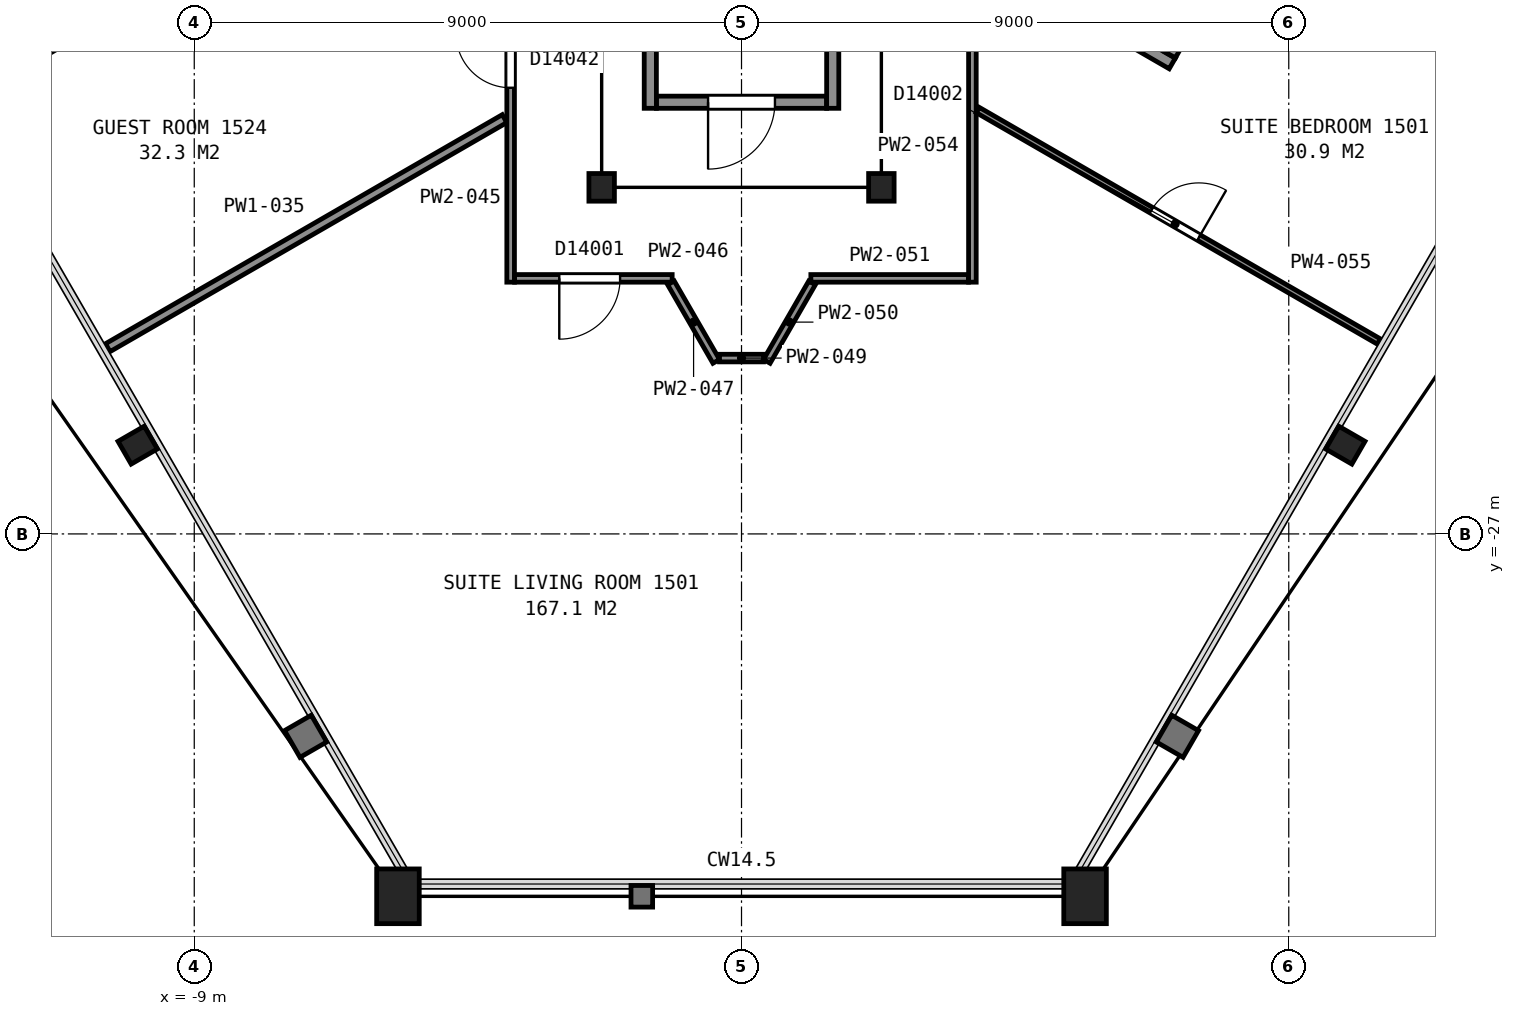
"""IFC4 building model, lengths in metres.
Left out: names, types, materials, properties, quantities, classifications, styles, units other than length and angle.
Written with IfcOpenShell. Run it as: python <this file> out.ifc"""

import sys

from ifc_helpers import new_model, si_unit, direction, frame, frame_2d, origin, origin_2d, place, context, subcontext, project, spatial, rectangle, hollow_rectangle, i_section, extrude, element, fill, save


model = new_model("IFC4")
c1 = context("Model", 3, precision=1e-05, world=origin(), true_north=direction((0.0, 1.0)))
c2 = subcontext(c1, "Body", "Model", "MODEL_VIEW")
j1 = project(units=[si_unit("LENGTHUNIT", "METRE"), si_unit("PLANEANGLEUNIT", "RADIAN")], contexts=[c1])
p1 = place(None, origin())
s1 = spatial("IfcSite", under=j1, at=p1, CompositionType="ELEMENT")
p2 = place(p1, origin())
s2 = spatial("IfcBuilding", under=s1, at=p2, CompositionType="ELEMENT")
p3 = place(p2, frame((0.0, 0.0, 69.2)))
s3 = spatial("IfcBuildingStorey", under=s2, at=p3, CompositionType="ELEMENT", Elevation=69.2)
p4 = place(p3, frame((-9.93, -25.54, 0.0), z_axis=(0.0, 0.0, 1.0), x_axis=(-0.5, 0.866025403784, 0.0)))
e1 = element("IfcColumn", 1, at=p4, inside=s3, PredefinedType="COLUMN", context=c2, shape_type="SweptSolid", body=[
    extrude(i_section(OverallWidth=0.432, OverallDepth=0.498, WebThickness=0.056, FlangeThickness=0.089, FilletRadius=0.015, at=origin_2d()), origin(), (0.0, 0.0, 1.0), 3.575),
])
for number, where, z_axis, x_axis in (
    (2, (-5.65, -32.96, 0.0), (0.0, 0.0, 1.0), (-1.0, 0.0, 0.0)),
    (3, (5.65, -32.96, 0.0), (0.0, 0.0, 1.0), (-1.0, 0.0, 0.0)),
):
    element("IfcColumn", number, at=place(p3, frame(where, z_axis=z_axis, x_axis=x_axis)), inside=s3, PredefinedType="COLUMN", context=c2, shape_type="SweptSolid", body=[
        extrude(hollow_rectangle(XDim=0.7, YDim=0.9, WallThickness=0.065, at=origin_2d()), origin(), (0.0, 0.0, 1.0), 3.56),
    ])
p5 = place(p3, frame((9.93, -25.54, 0.0), z_axis=(0.0, 0.0, 1.0), x_axis=(-0.5, -0.866025403784, 0.0)))
e4 = element("IfcColumn", 4, at=p5, inside=s3, PredefinedType="COLUMN", context=c2, shape_type="SweptSolid", body=[
    extrude(i_section(OverallWidth=0.432, OverallDepth=0.498, WebThickness=0.056, FlangeThickness=0.089, FilletRadius=0.015, at=origin_2d()), origin(), (0.0, 0.0, 1.0), 3.575),
])
for number, where, z_axis, x_axis in (
    (5, (-2.3, -21.3, 0.0), (0.0, 0.0, 1.0), (-1.0, 0.0, 0.0)),
    (6, (2.3, -21.3, 0.0), (0.0, 0.0, 1.0), (-1.0, 0.0, 0.0)),
):
    element("IfcColumn", number, at=place(p3, frame(where, z_axis=z_axis, x_axis=x_axis)), inside=s3, PredefinedType="COLUMN", context=c2, shape_type="SweptSolid", body=[
        extrude(i_section(OverallWidth=0.419, OverallDepth=0.455, WebThickness=0.042, FlangeThickness=0.068, FilletRadius=0.015, at=origin_2d()), origin(), (0.0, 0.0, 1.0), 3.6),
    ])
p6 = place(p3, frame((-1.4, -19.9, 0.0), z_axis=(0.0, 0.0, 1.0), x_axis=(1.0, 0.0, 0.0)))
e7 = element("IfcWall", 7, at=p6, inside=s3, PredefinedType="PARTITIONING", context=c2, shape_type="SweptSolid", body=[
    extrude(rectangle(XDim=2.8, YDim=0.2, at=frame_2d((1.4, 0.0))), origin(), (0.0, 0.0, 1.0), 3.35),
])
p7 = place(p6, frame((0.85, 0.0, 0.0)))
e8 = element("IfcOpeningElement", 8, at=p7, cuts=e7, PredefinedType="OPENING", context=c2, shape_type="SweptSolid", body=[
    extrude(rectangle(XDim=1.1, YDim=2.1, at=frame_2d((0.55, 1.05))), frame((0.0, 0.11, 0.0), z_axis=(0.0, -1.0, 0.0), x_axis=(1.0, 0.0, 0.0)), (0.0, 0.0, 1.0), 0.22),
])
for number, where, z_axis, x_axis in (
    (9, (1.5, -8.0, 0.0), (0.0, 0.0, 1.0), (0.0, -1.0, 0.0)),
    (10, (-1.5, -8.0, 0.0), (0.0, 0.0, 1.0), (0.0, -1.0, 0.0)),
):
    element("IfcWall", number, at=place(p3, frame(where, z_axis=z_axis, x_axis=x_axis)), inside=s3, PredefinedType="PARTITIONING", context=c2, shape_type="SweptSolid", body=[
        extrude(rectangle(XDim=12.0, YDim=0.2, at=frame_2d((6.0, 0.0))), origin(), (0.0, 0.0, 1.0), 3.35),
    ])
p8 = place(p3, frame((-12.794, -19.829, 0.0), z_axis=(0.0, 0.0, 1.0), x_axis=(0.866024716685, 0.500001190089, 0.0)))
e11 = element("IfcWall", 11, at=p8, inside=s3, PredefinedType="PARTITIONING", context=c2, shape_type="SweptSolid", body=[
    extrude(rectangle(XDim=8.492, YDim=0.15, at=frame_2d((4.246, 0.0))), origin(), (0.0, 0.0, 1.0), 2.613),
])
p9 = place(p3, frame((-10.423, -23.937, 0.0), z_axis=(0.0, 0.0, 1.0), x_axis=(0.866039368072, 0.499975812365, 0.0)))
e12 = element("IfcWall", 12, at=p9, inside=s3, PredefinedType="PARTITIONING", context=c2, shape_type="SweptSolid", body=[
    extrude(rectangle(XDim=7.535, YDim=0.15, at=frame_2d((3.768, 0.0))), origin(), (0.0, 0.0, 1.0), 2.613),
])
p10 = place(p3, frame((-3.797, -22.86, 0.0), z_axis=(0.0, 0.0, 1.0), x_axis=(0.0, 1.0, 0.0)))
e13 = element("IfcWall", 13, at=p10, inside=s3, PredefinedType="PARTITIONING", context=c2, shape_type="SweptSolid", body=[
    extrude(rectangle(XDim=4.471, YDim=0.125, at=frame_2d((2.235, 0.0))), origin(), (0.0, 0.0, 1.0), 2.613),
])
p11 = place(p10, frame((3.198, 0.0, 0.0)))
e14 = element("IfcOpeningElement", 14, at=p11, cuts=e13, PredefinedType="OPENING", context=c2, shape_type="SweptSolid", body=[
    extrude(rectangle(XDim=0.9, YDim=2.1, at=frame_2d((0.45, 1.05))), frame((0.0, 0.073, 0.0), z_axis=(0.0, -1.0, 0.0), x_axis=(1.0, 0.0, 0.0)), (0.0, 0.0, 1.0), 0.145),
])
p12 = place(p3, frame((-1.14, -22.797, 0.0), z_axis=(0.0, 0.0, 1.0), x_axis=(-1.0, 0.0, 0.0)))
e15 = element("IfcWall", 15, at=p12, inside=s3, PredefinedType="PARTITIONING", context=c2, shape_type="SweptSolid", body=[
    extrude(rectangle(XDim=2.592, YDim=0.125, at=frame_2d((1.296, 0.0))), origin(), (0.0, 0.0, 1.0), 2.613),
])
p13 = place(p12, frame((0.856, 0.0, 0.0)))
e16 = element("IfcOpeningElement", 16, at=p13, cuts=e15, PredefinedType="OPENING", context=c2, shape_type="SweptSolid", body=[
    extrude(rectangle(XDim=1.0, YDim=2.1, at=frame_2d((0.5, 1.05))), frame((0.0, 0.073, 0.0), z_axis=(0.0, -1.0, 0.0), x_axis=(1.0, 0.0, 0.0)), (0.0, 0.0, 1.0), 0.145),
])
p14 = place(p3, frame((-1.161, -22.871, 0.0), z_axis=(0.0, 0.0, 1.0), x_axis=(0.499609040113, -0.866251006947, 0.0)))
e17 = element("IfcWall", 17, at=p14, inside=s3, PredefinedType="PARTITIONING", context=c2, shape_type="SweptSolid", body=[
    extrude(rectangle(XDim=1.491, YDim=0.125, at=frame_2d((0.746, 0.0))), origin(), (0.0, 0.0, 1.0), 2.613),
])
p15 = place(p3, frame((-0.362, -24.108, 0.0), z_axis=(0.0, 0.0, 1.0), x_axis=(1.0, 0.0, 0.0)))
e18 = element("IfcWall", 18, at=p15, inside=s3, PredefinedType="PARTITIONING", context=c2, shape_type="SweptSolid", body=[
    extrude(rectangle(XDim=0.724, YDim=0.125, at=frame_2d((0.362, 0.0))), origin(), (0.0, 0.0, 1.0), 2.613),
])
p16 = place(p3, frame((0.416, -24.162, 0.0), z_axis=(0.0, 0.0, 1.0), x_axis=(0.499609040113, 0.866251006947, 0.0)))
e19 = element("IfcWall", 19, at=p16, inside=s3, PredefinedType="PARTITIONING", context=c2, shape_type="SweptSolid", body=[
    extrude(rectangle(XDim=1.491, YDim=0.125, at=frame_2d((0.746, 0.0))), origin(), (0.0, 0.0, 1.0), 2.613),
])
p17 = place(p3, frame((1.14, -22.797, 0.0), z_axis=(0.0, 0.0, 1.0), x_axis=(1.0, 0.0, 0.0)))
e20 = element("IfcWall", 20, at=p17, inside=s3, PredefinedType="PARTITIONING", context=c2, shape_type="SweptSolid", body=[
    extrude(rectangle(XDim=2.592, YDim=0.125, at=frame_2d((1.296, 0.0))), origin(), (0.0, 0.0, 1.0), 2.613),
])
p18 = place(p3, frame((3.797, -22.86, 0.0), z_axis=(0.0, 0.0, 1.0), x_axis=(0.0, 1.0, 0.0)))
e21 = element("IfcWall", 21, at=p18, inside=s3, PredefinedType="PARTITIONING", context=c2, shape_type="SweptSolid", body=[
    extrude(rectangle(XDim=4.471, YDim=0.125, at=frame_2d((2.235, 0.0))), origin(), (0.0, 0.0, 1.0), 2.613),
])
p19 = place(p3, frame((3.885, -20.028, 0.0), z_axis=(0.0, 0.0, 1.0), x_axis=(0.866080975745, -0.499903734186, 0.0)))
e22 = element("IfcWall", 22, at=p19, inside=s3, PredefinedType="PARTITIONING", context=c2, shape_type="SweptSolid", body=[
    extrude(rectangle(XDim=7.617, YDim=0.1, at=frame_2d((3.808, 0.0))), origin(), (0.0, 0.0, 1.0), 2.613),
])
p20 = place(p19, frame((3.299, 0.0, 0.0)))
e23 = element("IfcOpeningElement", 23, at=p20, cuts=e22, PredefinedType="OPENING", context=c2, shape_type="SweptSolid", body=[
    extrude(rectangle(XDim=0.9, YDim=2.1, at=frame_2d((0.45, 1.05))), frame((0.0, 0.06, 0.0), z_axis=(0.0, -1.0, 0.0), x_axis=(1.0, 0.0, 0.0)), (0.0, 0.0, 1.0), 0.12),
])
p21 = place(p3, frame((4.258, -17.631, 0.0), z_axis=(0.0, 0.0, 1.0), x_axis=(0.865982457891, -0.500074377092, 0.0)))
e24 = element("IfcWall", 24, at=p21, inside=s3, PredefinedType="PARTITIONING", context=c2, shape_type="SweptSolid", body=[
    extrude(rectangle(XDim=3.263, YDim=0.2, at=frame_2d((1.631, 0.0))), origin(), (0.0, 0.0, 1.0), 2.613),
])
p22 = place(p3, frame((5.558, -15.38, 0.0), z_axis=(0.0, 0.0, 1.0), x_axis=(0.866022790583, -0.50000452617, 0.0)))
e25 = element("IfcWall", 25, at=p22, inside=s3, PredefinedType="PARTITIONING", context=c2, shape_type="SweptSolid", body=[
    extrude(rectangle(XDim=8.491, YDim=0.15, at=frame_2d((4.246, 0.0))), origin(), (0.0, 0.0, 1.0), 2.613),
])
p23 = place(p3, frame((7.049, -19.122, 0.0), z_axis=(0.0, 0.0, 1.0), x_axis=(0.491544985814, 0.870852184312, 0.0)))
e26 = element("IfcWall", 26, at=p23, inside=s3, PredefinedType="PARTITIONING", context=c2, shape_type="SweptSolid", body=[
    extrude(rectangle(XDim=2.419, YDim=0.2, at=frame_2d((1.209, 0.0))), origin(), (0.0, 0.0, 1.0), 2.613),
])
p24 = place(p23, frame((0.795, 0.0, 0.0)))
e27 = element("IfcOpeningElement", 27, at=p24, cuts=e26, PredefinedType="OPENING", context=c2, shape_type="SweptSolid", body=[
    extrude(rectangle(XDim=0.8, YDim=2.1, at=frame_2d((0.4, 1.05))), frame((0.0, 0.11, 0.0), z_axis=(0.0, -1.0, 0.0), x_axis=(1.0, 0.0, 0.0)), (0.0, 0.0, 1.0), 0.22),
])
p25 = place(p7, origin())
e28 = element("IfcDoor", 28, at=p25, inside=s3, OperationType="SINGLE_SWING_LEFT", PredefinedType="DOOR", context=c2, shape_type="SweptSolid", body=[
    extrude(rectangle(XDim=1.1, YDim=2.1, at=frame_2d((0.55, 1.05))), frame((0.0, 0.025, 0.0), z_axis=(0.0, -1.0, 0.0), x_axis=(1.0, 0.0, 0.0)), (0.0, 0.0, 1.0), 0.05),
])
fill(e8, e28)
p26 = place(p11, origin())
e29 = element("IfcDoor", 29, at=p26, inside=s3, OperationType="SINGLE_SWING_RIGHT", PredefinedType="DOOR", context=c2, shape_type="SweptSolid", body=[
    extrude(rectangle(XDim=0.9, YDim=2.1, at=frame_2d((0.45, 1.05))), frame((0.0, 0.025, 0.0), z_axis=(0.0, -1.0, 0.0), x_axis=(1.0, 0.0, 0.0)), (0.0, 0.0, 1.0), 0.05),
])
fill(e14, e29)
p27 = place(p13, origin())
e30 = element("IfcDoor", 30, at=p27, inside=s3, OperationType="SINGLE_SWING_RIGHT", PredefinedType="DOOR", context=c2, shape_type="SweptSolid", body=[
    extrude(rectangle(XDim=1.0, YDim=2.1, at=frame_2d((0.5, 1.05))), frame((0.0, 0.025, 0.0), z_axis=(0.0, -1.0, 0.0), x_axis=(1.0, 0.0, 0.0)), (0.0, 0.0, 1.0), 0.05),
])
fill(e16, e30)
p28 = place(p20, origin())
e31 = element("IfcDoor", 31, at=p28, inside=s3, OperationType="SINGLE_SWING_RIGHT", PredefinedType="DOOR", context=c2, shape_type="SweptSolid", body=[
    extrude(rectangle(XDim=0.9, YDim=2.1, at=frame_2d((0.45, 1.05))), frame((0.0, 0.025, 0.0), z_axis=(0.0, -1.0, 0.0), x_axis=(1.0, 0.0, 0.0)), (0.0, 0.0, 1.0), 0.05),
])
fill(e23, e31)
save(model, sys.argv[1])
